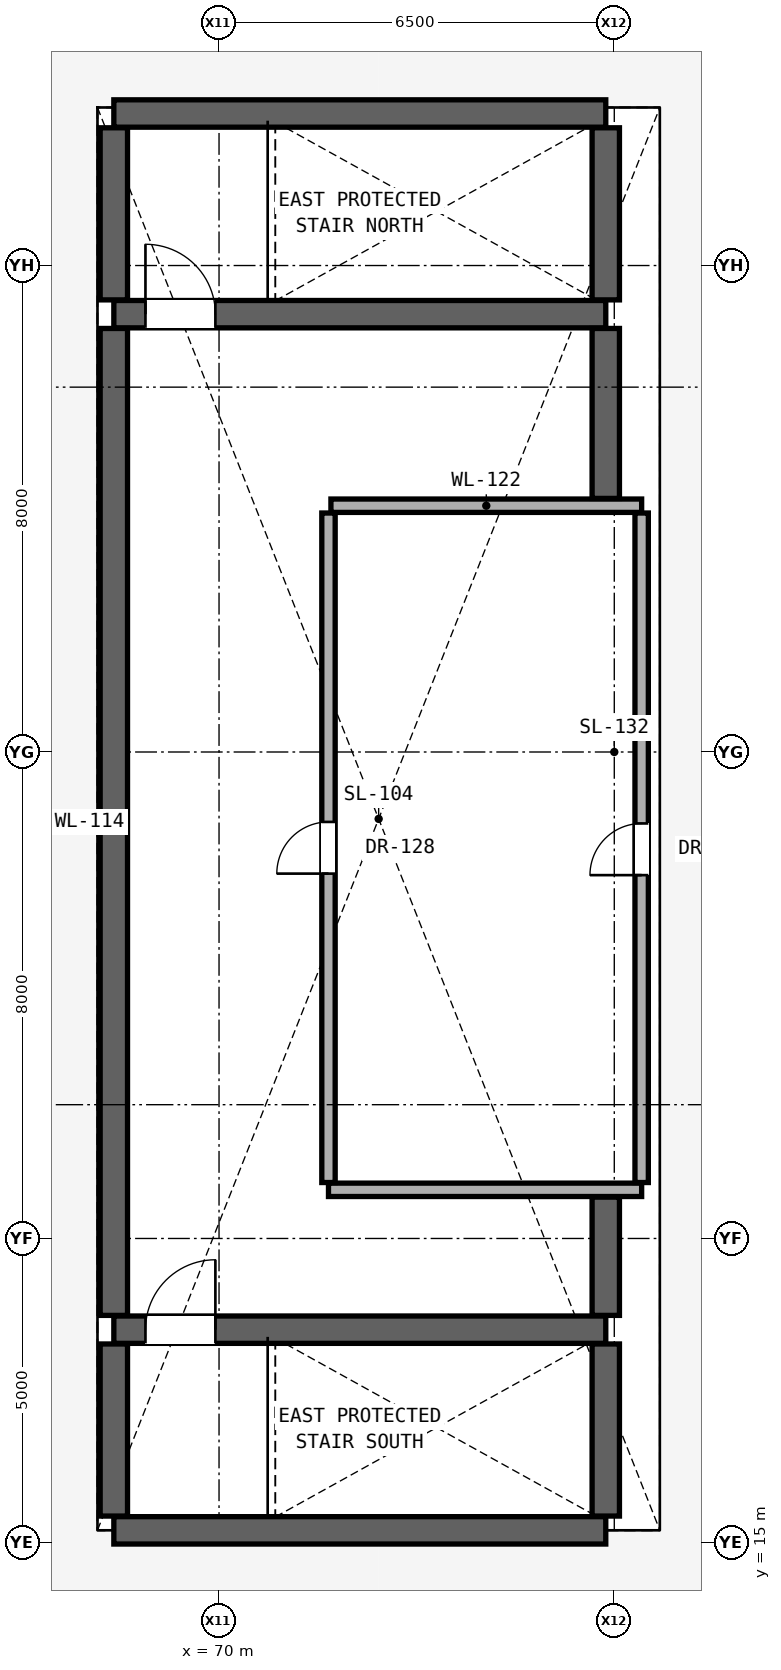
"""IFC4 building model, lengths in metres.
Left out: names, types, materials, properties, quantities, classifications, styles, units other than length and angle.
Written with IfcOpenShell. Run it as: python <this file> out.ifc"""

import sys

from ifc_helpers import new_model, si_unit, direction, frame, frame_2d, origin, place, context, subcontext, project, spatial, rectangle, extrude, element, fill, save


model = new_model("IFC4")
c1 = context("Model", 3, precision=1e-05, world=origin(), true_north=direction((0.0, 1.0)))
c2 = subcontext(c1, "Body", "Model", "MODEL_VIEW")
j1 = project(units=[si_unit("LENGTHUNIT", "METRE"), si_unit("PLANEANGLEUNIT", "RADIAN")], contexts=[c1])
p1 = place(None, origin())
s1 = spatial("IfcSite", under=j1, at=p1, CompositionType="ELEMENT")
p2 = place(p1, origin())
s2 = spatial("IfcBuilding", under=s1, at=p2, CompositionType="ELEMENT")
p3 = place(p2, frame((0.0, 0.0, 209.65)))
s3 = spatial("IfcBuildingStorey", under=s2, at=p3, CompositionType="ELEMENT", Elevation=209.65)
p4 = place(p3, frame((68.27, 15.2, 0.0), z_axis=(0.0, 0.0, 1.0), x_axis=(1.0, 0.0, 0.0)))
e1 = element("IfcWall", 1, at=p4, inside=s3, PredefinedType="SHEAR", context=c2, shape_type="SweptSolid", body=[
    extrude(rectangle(XDim=8.09, YDim=0.45, at=frame_2d((4.045, 0.0))), origin(), (0.0, 0.0, 1.0), 3.02),
])
p5 = place(p3, frame((68.27, 18.5, 0.0), z_axis=(0.0, 0.0, 1.0), x_axis=(1.0, 0.0, 0.0)))
e2 = element("IfcWall", 2, at=p5, inside=s3, PredefinedType="SHEAR", context=c2, shape_type="SweptSolid", body=[
    extrude(rectangle(XDim=8.09, YDim=0.45, at=frame_2d((4.045, 0.0))), origin(), (0.0, 0.0, 1.0), 3.02),
])
p6 = place(p5, frame((0.52, 0.0, 0.0)))
e3 = element("IfcOpeningElement", 3, at=p6, cuts=e2, PredefinedType="OPENING", context=c2, shape_type="SweptSolid", body=[
    extrude(rectangle(XDim=1.15, YDim=2.2, at=frame_2d((0.575, 1.1))), frame((0.0, 0.235, 0.0), z_axis=(0.0, -1.0, 0.0), x_axis=(1.0, 0.0, 0.0)), (0.0, 0.0, 1.0), 0.47),
])
p7 = place(p3, frame((71.8, 20.8, 0.0), z_axis=(0.0, 0.0, 1.0), x_axis=(1.0, 0.0, 0.0)))
e4 = element("IfcWall", 4, at=p7, inside=s3, PredefinedType="SOLIDWALL", context=c2, shape_type="SweptSolid", body=[
    extrude(rectangle(XDim=5.15, YDim=0.22, at=frame_2d((2.575, 0.0))), origin(), (0.0, 0.0, 1.0), 3.02),
])
p8 = place(p3, frame((71.84, 32.05, 0.0), z_axis=(0.0, 0.0, 1.0), x_axis=(1.0, 0.0, 0.0)))
e5 = element("IfcWall", 5, at=p8, inside=s3, PredefinedType="SOLIDWALL", context=c2, shape_type="SweptSolid", body=[
    extrude(rectangle(XDim=5.11, YDim=0.22, at=frame_2d((2.555, 0.0))), origin(), (0.0, 0.0, 1.0), 3.02),
])
p9 = place(p3, frame((68.27, 35.2, 0.0), z_axis=(0.0, 0.0, 1.0), x_axis=(1.0, 0.0, 0.0)))
e6 = element("IfcWall", 6, at=p9, inside=s3, PredefinedType="SHEAR", context=c2, shape_type="SweptSolid", body=[
    extrude(rectangle(XDim=8.09, YDim=0.45, at=frame_2d((4.045, 0.0))), origin(), (0.0, 0.0, 1.0), 3.02),
])
p10 = place(p9, frame((0.52, 0.0, 0.0)))
e7 = element("IfcOpeningElement", 7, at=p10, cuts=e6, PredefinedType="OPENING", context=c2, shape_type="SweptSolid", body=[
    extrude(rectangle(XDim=1.15, YDim=2.2, at=frame_2d((0.575, 1.1))), frame((0.0, 0.235, 0.0), z_axis=(0.0, -1.0, 0.0), x_axis=(1.0, 0.0, 0.0)), (0.0, 0.0, 1.0), 0.47),
])
p11 = place(p3, frame((68.27, 38.5, 0.0), z_axis=(0.0, 0.0, 1.0), x_axis=(1.0, 0.0, 0.0)))
e8 = element("IfcWall", 8, at=p11, inside=s3, PredefinedType="SHEAR", context=c2, shape_type="SweptSolid", body=[
    extrude(rectangle(XDim=8.09, YDim=0.45, at=frame_2d((4.045, 0.0))), origin(), (0.0, 0.0, 1.0), 3.02),
])
p12 = place(p3, frame((68.27, 15.435, 0.0), z_axis=(0.0, 0.0, 1.0), x_axis=(0.0, 1.0, 0.0)))
e9 = element("IfcWall", 9, at=p12, inside=s3, PredefinedType="SHEAR", context=c2, shape_type="SweptSolid", body=[
    extrude(rectangle(XDim=2.83, YDim=0.45, at=frame_2d((1.415, 0.0))), origin(), (0.0, 0.0, 1.0), 3.02),
])
p13 = place(p3, frame((68.27, 18.735, 0.0), z_axis=(0.0, 0.0, 1.0), x_axis=(0.0, 1.0, 0.0)))
e10 = element("IfcWall", 10, at=p13, inside=s3, PredefinedType="SHEAR", context=c2, shape_type="SweptSolid", body=[
    extrude(rectangle(XDim=16.23, YDim=0.45, at=frame_2d((8.115, 0.0))), origin(), (0.0, 0.0, 1.0), 3.02),
])
p14 = place(p3, frame((68.27, 35.435, 0.0), z_axis=(0.0, 0.0, 1.0), x_axis=(0.0, 1.0, 0.0)))
e11 = element("IfcWall", 11, at=p14, inside=s3, PredefinedType="SHEAR", context=c2, shape_type="SweptSolid", body=[
    extrude(rectangle(XDim=2.83, YDim=0.45, at=frame_2d((1.415, 0.0))), origin(), (0.0, 0.0, 1.0), 3.02),
])
p15 = place(p3, frame((71.8, 20.92, 0.0), z_axis=(0.0, 0.0, 1.0), x_axis=(0.0, 1.0, 0.0)))
e12 = element("IfcWall", 12, at=p15, inside=s3, PredefinedType="SOLIDWALL", context=c2, shape_type="SweptSolid", body=[
    extrude(rectangle(XDim=11.01, YDim=0.22, at=frame_2d((5.505, 0.0))), origin(), (0.0, 0.0, 1.0), 3.02),
])
p16 = place(p15, frame((5.08, 0.0, 0.0)))
e13 = element("IfcOpeningElement", 13, at=p16, cuts=e12, PredefinedType="OPENING", context=c2, shape_type="SweptSolid", body=[
    extrude(rectangle(XDim=0.85, YDim=2.01, at=frame_2d((0.425, 1.005))), frame((0.0, 0.12, 0.0), z_axis=(0.0, -1.0, 0.0), x_axis=(1.0, 0.0, 0.0)), (0.0, 0.0, 1.0), 0.24),
])
p17 = place(p3, frame((76.36, 15.435, 0.0), z_axis=(0.0, 0.0, 1.0), x_axis=(0.0, 1.0, 0.0)))
e14 = element("IfcWall", 14, at=p17, inside=s3, PredefinedType="SHEAR", context=c2, shape_type="SweptSolid", body=[
    extrude(rectangle(XDim=2.83, YDim=0.45, at=frame_2d((1.415, 0.0))), origin(), (0.0, 0.0, 1.0), 3.02),
])
p18 = place(p3, frame((76.36, 18.735, 0.0), z_axis=(0.0, 0.0, 1.0), x_axis=(0.0, 1.0, 0.0)))
e15 = element("IfcWall", 15, at=p18, inside=s3, PredefinedType="SHEAR", context=c2, shape_type="SweptSolid", body=[
    extrude(rectangle(XDim=1.945, YDim=0.45, at=frame_2d((0.972, 0.0))), origin(), (0.0, 0.0, 1.0), 3.02),
])
p19 = place(p3, frame((76.36, 32.17, 0.0), z_axis=(0.0, 0.0, 1.0), x_axis=(0.0, 1.0, 0.0)))
e16 = element("IfcWall", 16, at=p19, inside=s3, PredefinedType="SHEAR", context=c2, shape_type="SweptSolid", body=[
    extrude(rectangle(XDim=2.795, YDim=0.45, at=frame_2d((1.397, 0.0))), origin(), (0.0, 0.0, 1.0), 3.02),
])
p20 = place(p3, frame((76.36, 35.435, 0.0), z_axis=(0.0, 0.0, 1.0), x_axis=(0.0, 1.0, 0.0)))
e17 = element("IfcWall", 17, at=p20, inside=s3, PredefinedType="SHEAR", context=c2, shape_type="SweptSolid", body=[
    extrude(rectangle(XDim=2.83, YDim=0.45, at=frame_2d((1.415, 0.0))), origin(), (0.0, 0.0, 1.0), 3.02),
])
p21 = place(p3, frame((76.95, 20.92, 0.0), z_axis=(0.0, 0.0, 1.0), x_axis=(0.0, 1.0, 0.0)))
e18 = element("IfcWall", 18, at=p21, inside=s3, PredefinedType="SOLIDWALL", context=c2, shape_type="SweptSolid", body=[
    extrude(rectangle(XDim=11.01, YDim=0.22, at=frame_2d((5.505, 0.0))), origin(), (0.0, 0.0, 1.0), 3.02),
])
p22 = place(p21, frame((5.055, 0.0, 0.0)))
e19 = element("IfcOpeningElement", 19, at=p22, cuts=e18, PredefinedType="OPENING", context=c2, shape_type="SweptSolid", body=[
    extrude(rectangle(XDim=0.85, YDim=2.01, at=frame_2d((0.425, 1.005))), frame((0.0, 0.12, 0.0), z_axis=(0.0, -1.0, 0.0), x_axis=(1.0, 0.0, 0.0)), (0.0, 0.0, 1.0), 0.24),
])
p23 = place(p10, origin())
e20 = element("IfcDoor", 20, at=p23, inside=s3, OperationType="SINGLE_SWING_LEFT", PredefinedType="DOOR", context=c2, shape_type="SweptSolid", body=[
    extrude(rectangle(XDim=1.15, YDim=2.2, at=frame_2d((0.575, 1.1))), frame((0.0, 0.025, 0.0), z_axis=(0.0, -1.0, 0.0), x_axis=(1.0, 0.0, 0.0)), (0.0, 0.0, 1.0), 0.05),
])
fill(e7, e20)
p24 = place(p6, origin())
e21 = element("IfcDoor", 21, at=p24, inside=s3, OperationType="SINGLE_SWING_RIGHT", PredefinedType="DOOR", context=c2, shape_type="SweptSolid", body=[
    extrude(rectangle(XDim=1.15, YDim=2.2, at=frame_2d((0.575, 1.1))), frame((0.0, 0.025, 0.0), z_axis=(0.0, -1.0, 0.0), x_axis=(1.0, 0.0, 0.0)), (0.0, 0.0, 1.0), 0.05),
])
fill(e3, e21)
p25 = place(p16, origin())
e22 = element("IfcDoor", 22, at=p25, inside=s3, OperationType="SINGLE_SWING_LEFT", PredefinedType="DOOR", context=c2, shape_type="SweptSolid", body=[
    extrude(rectangle(XDim=0.85, YDim=2.01, at=frame_2d((0.425, 1.005))), frame((0.0, 0.025, 0.0), z_axis=(0.0, -1.0, 0.0), x_axis=(1.0, 0.0, 0.0)), (0.0, 0.0, 1.0), 0.05),
])
fill(e13, e22)
p26 = place(p22, origin())
e23 = element("IfcDoor", 23, at=p26, inside=s3, OperationType="SINGLE_SWING_LEFT", PredefinedType="DOOR", context=c2, shape_type="SweptSolid", body=[
    extrude(rectangle(XDim=0.85, YDim=2.01, at=frame_2d((0.425, 1.005))), frame((0.0, 0.025, 0.0), z_axis=(0.0, -1.0, 0.0), x_axis=(1.0, 0.0, 0.0)), (0.0, 0.0, 1.0), 0.05),
])
fill(e19, e23)
save(model, sys.argv[1])
